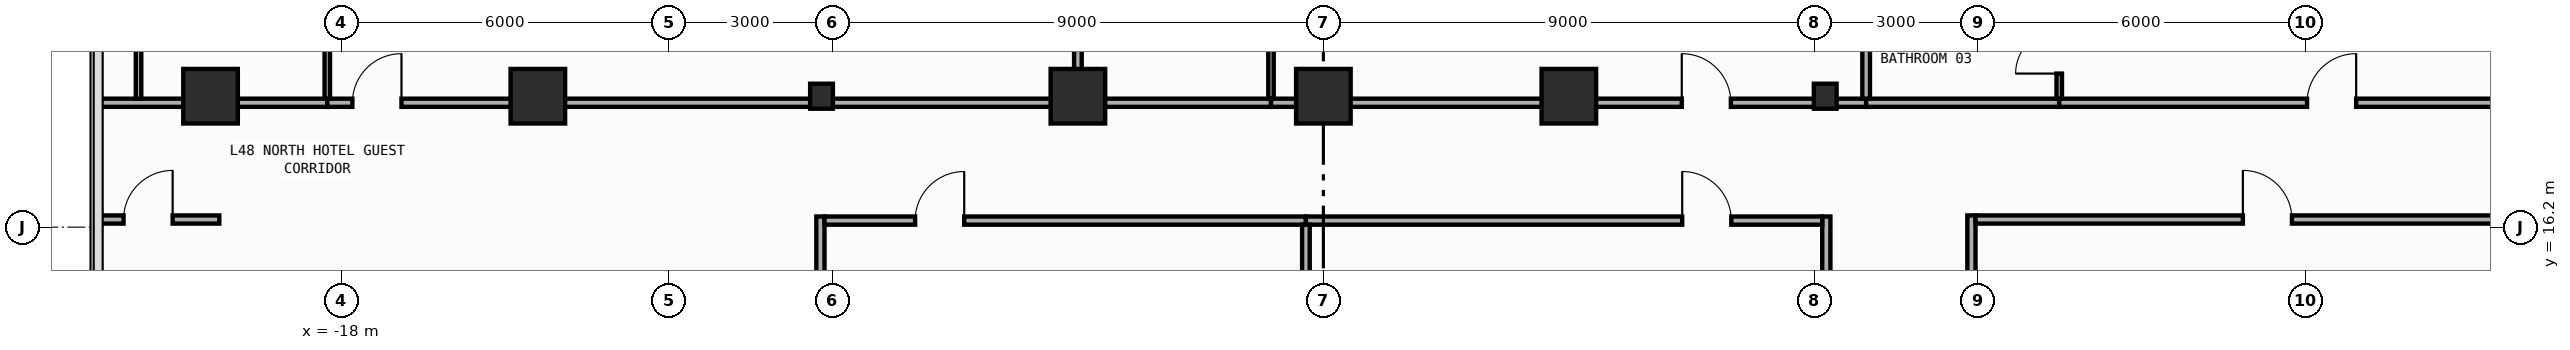
"""IFC4 building model, lengths in metres.
Left out: names, types, materials, properties, quantities, classifications, styles, units other than length and angle.
Written with IfcOpenShell. Run it as: python <this file> out.ifc"""

import sys

from ifc_helpers import new_model, si_unit, direction, frame, frame_2d, origin, origin_2d, place, context, subcontext, project, spatial, rectangle, i_section, extrude, element, fill, save


model = new_model("IFC4")
c1 = context("Model", 3, precision=1e-05, world=origin(), true_north=direction((0.0, 1.0)))
c2 = subcontext(c1, "Body", "Model", "MODEL_VIEW")
j1 = project(units=[si_unit("LENGTHUNIT", "METRE"), si_unit("PLANEANGLEUNIT", "RADIAN")], contexts=[c1])
p1 = place(None, origin())
s1 = spatial("IfcSite", under=j1, at=p1, CompositionType="ELEMENT")
p2 = place(p1, origin())
s2 = spatial("IfcBuilding", under=s1, at=p2, CompositionType="ELEMENT")
p3 = place(p2, frame((0.0, 0.0, 206.8)))
s3 = spatial("IfcBuildingStorey", under=s2, at=p3, CompositionType="ELEMENT", Elevation=206.8)
for number, where, z_axis, x_axis in (
    (1, (-9.2, 18.6, 0.0), (0.0, 0.0, 1.0), (1.0, 0.0, 0.0)),
    (2, (9.2, 18.6, 0.0), (0.0, 0.0, 1.0), (1.0, 0.0, 0.0)),
):
    element("IfcColumn", number, at=place(p3, frame(where, z_axis=z_axis, x_axis=x_axis)), inside=s3, PredefinedType="COLUMN", context=c2, shape_type="SweptSolid", body=[
        extrude(i_section(OverallWidth=0.417, OverallDepth=0.458, WebThickness=0.03, FlangeThickness=0.05, FilletRadius=0.022, at=origin_2d()), origin(), (0.0, 0.0, 1.0), 3.8),
    ])
for number, where, z_axis, x_axis in (
    (3, (-20.4, 18.6, 0.0), (0.0, 0.0, 1.0), (1.0, 0.0, 0.0)),
    (4, (-14.4, 18.6, 0.0), (0.0, 0.0, 1.0), (1.0, 0.0, 0.0)),
    (5, (-4.5, 18.6, 0.0), (0.0, 0.0, 1.0), (1.0, 0.0, 0.0)),
    (6, (0.0, 18.6, 0.0), (0.0, 0.0, 1.0), (1.0, 0.0, 0.0)),
    (7, (4.5, 18.6, 0.0), (0.0, 0.0, 1.0), (1.0, 0.0, 0.0)),
):
    element("IfcColumn", number, at=place(p3, frame(where, z_axis=z_axis, x_axis=x_axis)), inside=s3, PredefinedType="COLUMN", context=c2, shape_type="SweptSolid", body=[
        extrude(rectangle(XDim=1.0, YDim=1.0, at=origin_2d()), origin(), (0.0, 0.0, 1.0), 3.8),
    ])
p4 = place(p3, frame((-9.22, 4.2, 0.0), z_axis=(0.0, 0.0, 1.0), x_axis=(0.0, 1.0, 0.0)))
e8 = element("IfcWall", 8, at=p4, inside=s3, PredefinedType="PARTITIONING", context=c2, shape_type="SweptSolid", body=[
    extrude(rectangle(XDim=12.195, YDim=0.15, at=frame_2d((6.098, 0.0))), origin(), (0.0, 0.0, 1.0), 2.952),
])
p5 = place(p4, frame((0.663, 0.0, 0.0)))
e9 = element("IfcOpeningElement", 9, at=p5, cuts=e8, PredefinedType="OPENING", context=c2, shape_type="SweptSolid", body=[
    extrude(rectangle(XDim=0.9, YDim=2.15, at=frame_2d((0.45, 1.075))), frame((0.0, 0.085, 0.0), z_axis=(0.0, -1.0, 0.0), x_axis=(1.0, 0.0, 0.0)), (0.0, 0.0, 1.0), 0.17),
])
p6 = place(p3, frame((9.22, 4.2, 0.0), z_axis=(0.0, 0.0, 1.0), x_axis=(0.0, 1.0, 0.0)))
e10 = element("IfcWall", 10, at=p6, inside=s3, PredefinedType="PARTITIONING", context=c2, shape_type="SweptSolid", body=[
    extrude(rectangle(XDim=12.195, YDim=0.15, at=frame_2d((6.098, 0.0))), origin(), (0.0, 0.0, 1.0), 2.952),
])
p7 = place(p6, frame((0.663, 0.0, 0.0)))
e11 = element("IfcOpeningElement", 11, at=p7, cuts=e10, PredefinedType="OPENING", context=c2, shape_type="SweptSolid", body=[
    extrude(rectangle(XDim=0.9, YDim=2.15, at=frame_2d((0.45, 1.075))), frame((0.0, 0.085, 0.0), z_axis=(0.0, -1.0, 0.0), x_axis=(1.0, 0.0, 0.0)), (0.0, 0.0, 1.0), 0.17),
])
p8 = place(p3, frame((11.88, 7.16, 0.0), z_axis=(0.0, 0.0, 1.0), x_axis=(0.0, 1.0, 0.0)))
e12 = element("IfcWall", 12, at=p8, inside=s3, PredefinedType="PARTITIONING", context=c2, shape_type="SweptSolid", body=[
    extrude(rectangle(XDim=9.255, YDim=0.15, at=frame_2d((4.627, 0.0))), origin(), (0.0, 0.0, 1.0), 3.54),
])
p9 = place(p8, frame((0.46, 0.0, 0.0)))
e13 = element("IfcOpeningElement", 13, at=p9, cuts=e12, PredefinedType="OPENING", context=c2, shape_type="SweptSolid", body=[
    extrude(rectangle(XDim=0.9, YDim=2.15, at=frame_2d((0.45, 1.075))), frame((0.0, 0.085, 0.0), z_axis=(0.0, -1.0, 0.0), x_axis=(1.0, 0.0, 0.0)), (0.0, 0.0, 1.0), 0.17),
])
p10 = place(p3, frame((-9.145, 16.32, 0.0), z_axis=(0.0, 0.0, 1.0), x_axis=(1.0, 0.0, 0.0)))
e14 = element("IfcWall", 14, at=p10, inside=s3, PredefinedType="PARTITIONING", context=c2, shape_type="SweptSolid", body=[
    extrude(rectangle(XDim=8.825, YDim=0.15, at=frame_2d((4.413, 0.0))), origin(), (0.0, 0.0, 1.0), 3.54),
])
p11 = place(p10, frame((1.661, 0.0, 0.0)))
e15 = element("IfcOpeningElement", 15, at=p11, cuts=e14, PredefinedType="OPENING", context=c2, shape_type="SweptSolid", body=[
    extrude(rectangle(XDim=0.9, YDim=2.15, at=frame_2d((0.45, 1.075))), frame((0.0, 0.085, 0.0), z_axis=(0.0, -1.0, 0.0), x_axis=(1.0, 0.0, 0.0)), (0.0, 0.0, 1.0), 0.17),
])
p12 = place(p3, frame((-0.32, 16.32, 0.0), z_axis=(0.0, 0.0, 1.0), x_axis=(1.0, 0.0, 0.0)))
e16 = element("IfcWall", 16, at=p12, inside=s3, PredefinedType="PARTITIONING", context=c2, shape_type="SweptSolid", body=[
    extrude(rectangle(XDim=9.465, YDim=0.15, at=frame_2d((4.732, 0.0))), origin(), (0.0, 0.0, 1.0), 3.54),
])
p13 = place(p12, frame((6.898, 0.0, 0.0)))
e17 = element("IfcOpeningElement", 17, at=p13, cuts=e16, PredefinedType="OPENING", context=c2, shape_type="SweptSolid", body=[
    extrude(rectangle(XDim=0.9, YDim=2.15, at=frame_2d((0.45, 1.075))), frame((0.0, 0.085, 0.0), z_axis=(0.0, -1.0, 0.0), x_axis=(1.0, 0.0, 0.0)), (0.0, 0.0, 1.0), 0.17),
])
p14 = place(p3, frame((-22.455, 18.48, 0.0), z_axis=(0.0, 0.0, 1.0), x_axis=(1.0, 0.0, 0.0)))
e18 = element("IfcWall", 18, at=p14, inside=s3, PredefinedType="PARTITIONING", context=c2, shape_type="SweptSolid", body=[
    extrude(rectangle(XDim=4.195, YDim=0.15, at=frame_2d((2.098, 0.0))), origin(), (0.0, 0.0, 1.0), 2.952),
])
p15 = place(p3, frame((-18.26, 18.48, 0.0), z_axis=(0.0, 0.0, 1.0), x_axis=(1.0, 0.0, 0.0)))
e19 = element("IfcWall", 19, at=p15, inside=s3, PredefinedType="PARTITIONING", context=c2, shape_type="SweptSolid", body=[
    extrude(rectangle(XDim=13.76, YDim=0.15, at=frame_2d((6.88, 0.0))), origin(), (0.0, 0.0, 1.0), 2.952),
])
p16 = place(p15, frame((0.46, 0.0, 0.0)))
e20 = element("IfcOpeningElement", 20, at=p16, cuts=e19, PredefinedType="OPENING", context=c2, shape_type="SweptSolid", body=[
    extrude(rectangle(XDim=0.9, YDim=2.15, at=frame_2d((0.45, 1.075))), frame((0.0, 0.085, 0.0), z_axis=(0.0, -1.0, 0.0), x_axis=(1.0, 0.0, 0.0)), (0.0, 0.0, 1.0), 0.17),
])
p17 = place(p3, frame((-4.5, 18.48, 0.0), z_axis=(0.0, 0.0, 1.0), x_axis=(1.0, 0.0, 0.0)))
e21 = element("IfcWall", 21, at=p17, inside=s3, PredefinedType="PARTITIONING", context=c2, shape_type="SweptSolid", body=[
    extrude(rectangle(XDim=3.54, YDim=0.15, at=frame_2d((1.77, 0.0))), origin(), (0.0, 0.0, 1.0), 2.952),
])
p18 = place(p3, frame((-0.96, 18.48, 0.0), z_axis=(0.0, 0.0, 1.0), x_axis=(1.0, 0.0, 0.0)))
e22 = element("IfcWall", 22, at=p18, inside=s3, PredefinedType="PARTITIONING", context=c2, shape_type="SweptSolid", body=[
    extrude(rectangle(XDim=10.91, YDim=0.15, at=frame_2d((5.455, 0.0))), origin(), (0.0, 0.0, 1.0), 2.952),
])
p19 = place(p18, frame((7.53, 0.0, 0.0)))
e23 = element("IfcOpeningElement", 23, at=p19, cuts=e22, PredefinedType="OPENING", context=c2, shape_type="SweptSolid", body=[
    extrude(rectangle(XDim=0.9, YDim=2.15, at=frame_2d((0.45, 1.075))), frame((0.0, 0.085, 0.0), z_axis=(0.0, -1.0, 0.0), x_axis=(1.0, 0.0, 0.0)), (0.0, 0.0, 1.0), 0.17),
])
p20 = place(p3, frame((9.95, 18.48, 0.0), z_axis=(0.0, 0.0, 1.0), x_axis=(1.0, 0.0, 0.0)))
e24 = element("IfcWall", 24, at=p20, inside=s3, PredefinedType="PARTITIONING", context=c2, shape_type="SweptSolid", body=[
    extrude(rectangle(XDim=3.54, YDim=0.15, at=frame_2d((1.77, 0.0))), origin(), (0.0, 0.0, 1.0), 3.54),
])
p21 = place(p3, frame((13.49, 18.48, 0.0), z_axis=(0.0, 0.0, 1.0), x_axis=(1.0, 0.0, 0.0)))
e25 = element("IfcWall", 25, at=p21, inside=s3, PredefinedType="PARTITIONING", context=c2, shape_type="SweptSolid", body=[
    extrude(rectangle(XDim=8.965, YDim=0.15, at=frame_2d((4.482, 0.0))), origin(), (0.0, 0.0, 1.0), 3.54),
])
p22 = place(p21, frame((4.543, 0.0, 0.0)))
e26 = element("IfcOpeningElement", 26, at=p22, cuts=e25, PredefinedType="OPENING", context=c2, shape_type="SweptSolid", body=[
    extrude(rectangle(XDim=0.9, YDim=2.15, at=frame_2d((0.45, 1.075))), frame((0.0, 0.085, 0.0), z_axis=(0.0, -1.0, 0.0), x_axis=(1.0, 0.0, 0.0)), (0.0, 0.0, 1.0), 0.17),
])
p23 = place(p3, frame((11.955, 16.34, 0.0), z_axis=(0.0, 0.0, 1.0), x_axis=(1.0, 0.0, 0.0)))
e27 = element("IfcWall", 27, at=p23, inside=s3, PredefinedType="PARTITIONING", context=c2, shape_type="SweptSolid", body=[
    extrude(rectangle(XDim=10.5, YDim=0.15, at=frame_2d((5.25, 0.0))), origin(), (0.0, 0.0, 1.0), 3.54),
])
p24 = place(p23, frame((4.901, 0.0, 0.0)))
e28 = element("IfcOpeningElement", 28, at=p24, cuts=e27, PredefinedType="OPENING", context=c2, shape_type="SweptSolid", body=[
    extrude(rectangle(XDim=0.9, YDim=2.15, at=frame_2d((0.45, 1.075))), frame((0.0, 0.085, 0.0), z_axis=(0.0, -1.0, 0.0), x_axis=(1.0, 0.0, 0.0)), (0.0, 0.0, 1.0), 0.17),
])
p25 = place(p3, frame((-22.455, 16.34, 0.0), z_axis=(0.0, 0.0, 1.0), x_axis=(1.0, 0.0, 0.0)))
e29 = element("IfcWall", 29, at=p25, inside=s3, PredefinedType="PARTITIONING", context=c2, shape_type="SweptSolid", body=[
    extrude(rectangle(XDim=2.215, YDim=0.15, at=frame_2d((1.107, 0.0))), origin(), (0.0, 0.0, 1.0), 3.54),
])
p26 = place(p25, frame((0.46, 0.0, 0.0)))
e30 = element("IfcOpeningElement", 30, at=p26, cuts=e29, PredefinedType="OPENING", context=c2, shape_type="SweptSolid", body=[
    extrude(rectangle(XDim=0.9, YDim=2.15, at=frame_2d((0.45, 1.075))), frame((0.0, 0.085, 0.0), z_axis=(0.0, -1.0, 0.0), x_axis=(1.0, 0.0, 0.0)), (0.0, 0.0, 1.0), 0.17),
])
p27 = place(p3, frame((-0.32, 4.27, 0.0), z_axis=(0.0, 0.0, 1.0), x_axis=(0.0, 1.0, 0.0)))
e31 = element("IfcWall", 31, at=p27, inside=s3, PredefinedType="PARTITIONING", context=c2, shape_type="SweptSolid", body=[
    extrude(rectangle(XDim=11.975, YDim=0.14, at=frame_2d((5.988, 0.0))), origin(), (0.0, 0.0, 1.0), 3.54),
])
p28 = place(p3, frame((-18.26, 18.555, 0.0), z_axis=(0.0, 0.0, 1.0), x_axis=(0.0, 1.0, 0.0)))
e32 = element("IfcWall", 32, at=p28, inside=s3, PredefinedType="PARTITIONING", context=c2, shape_type="SweptSolid", body=[
    extrude(rectangle(XDim=2.965, YDim=0.1, at=frame_2d((1.482, 0.0))), origin(), (0.0, 0.0, 1.0), 3.54),
])
p29 = place(p28, frame((1.705, 0.0, 0.0)))
e33 = element("IfcOpeningElement", 33, at=p29, cuts=e32, PredefinedType="OPENING", context=c2, shape_type="SweptSolid", body=[
    extrude(rectangle(XDim=0.8, YDim=2.1, at=frame_2d((0.4, 1.05))), frame((0.0, 0.06, 0.0), z_axis=(0.0, -1.0, 0.0), x_axis=(1.0, 0.0, 0.0)), (0.0, 0.0, 1.0), 0.12),
])
p30 = place(p3, frame((-4.5, 18.555, 0.0), z_axis=(0.0, 0.0, 1.0), x_axis=(0.0, 1.0, 0.0)))
e34 = element("IfcWall", 34, at=p30, inside=s3, PredefinedType="PARTITIONING", context=c2, shape_type="SweptSolid", body=[
    extrude(rectangle(XDim=3.015, YDim=0.14, at=frame_2d((1.508, 0.0))), origin(), (0.0, 0.0, 1.0), 3.54),
])
p31 = place(p3, frame((-0.96, 18.555, 0.0), z_axis=(0.0, 0.0, 1.0), x_axis=(0.0, 1.0, 0.0)))
e35 = element("IfcWall", 35, at=p31, inside=s3, PredefinedType="PARTITIONING", context=c2, shape_type="SweptSolid", body=[
    extrude(rectangle(XDim=2.965, YDim=0.1, at=frame_2d((1.482, 0.0))), origin(), (0.0, 0.0, 1.0), 3.54),
])
p32 = place(p31, frame((1.705, 0.0, 0.0)))
e36 = element("IfcOpeningElement", 36, at=p32, cuts=e35, PredefinedType="OPENING", context=c2, shape_type="SweptSolid", body=[
    extrude(rectangle(XDim=0.8, YDim=2.1, at=frame_2d((0.4, 1.05))), frame((0.0, 0.06, 0.0), z_axis=(0.0, -1.0, 0.0), x_axis=(1.0, 0.0, 0.0)), (0.0, 0.0, 1.0), 0.12),
])
p33 = place(p3, frame((9.95, 18.555, 0.0), z_axis=(0.0, 0.0, 1.0), x_axis=(0.0, 1.0, 0.0)))
e37 = element("IfcWall", 37, at=p33, inside=s3, PredefinedType="PARTITIONING", context=c2, shape_type="SweptSolid", body=[
    extrude(rectangle(XDim=3.015, YDim=0.14, at=frame_2d((1.508, 0.0))), origin(), (0.0, 0.0, 1.0), 3.54),
])
p34 = place(p3, frame((13.49, 18.555, 0.0), z_axis=(0.0, 0.0, 1.0), x_axis=(0.0, 1.0, 0.0)))
e38 = element("IfcWall", 38, at=p34, inside=s3, PredefinedType="PARTITIONING", context=c2, shape_type="SweptSolid", body=[
    extrude(rectangle(XDim=2.965, YDim=0.1, at=frame_2d((1.482, 0.0))), origin(), (0.0, 0.0, 1.0), 3.54),
])
p35 = place(p34, frame((0.46, 0.0, 0.0)))
e39 = element("IfcOpeningElement", 39, at=p35, cuts=e38, PredefinedType="OPENING", context=c2, shape_type="SweptSolid", body=[
    extrude(rectangle(XDim=0.8, YDim=2.1, at=frame_2d((0.4, 1.05))), frame((0.0, 0.06, 0.0), z_axis=(0.0, -1.0, 0.0), x_axis=(1.0, 0.0, 0.0)), (0.0, 0.0, 1.0), 0.12),
])
p36 = place(p3, frame((-21.72, 18.555, 0.0), z_axis=(0.0, 0.0, 1.0), x_axis=(0.0, 1.0, 0.0)))
e40 = element("IfcWall", 40, at=p36, inside=s3, PredefinedType="PARTITIONING", context=c2, shape_type="SweptSolid", body=[
    extrude(rectangle(XDim=2.965, YDim=0.1, at=frame_2d((1.482, 0.0))), origin(), (0.0, 0.0, 1.0), 3.54),
])
p37 = place(p11, origin())
e41 = element("IfcDoor", 41, at=p37, inside=s3, OperationType="SINGLE_SWING_RIGHT", PredefinedType="DOOR", context=c2, shape_type="SweptSolid", body=[
    extrude(rectangle(XDim=0.9, YDim=2.15, at=frame_2d((0.45, 1.075))), frame((0.0, 0.025, 0.0), z_axis=(0.0, -1.0, 0.0), x_axis=(1.0, 0.0, 0.0)), (0.0, 0.0, 1.0), 0.05),
])
fill(e15, e41)
p38 = place(p13, origin())
e42 = element("IfcDoor", 42, at=p38, inside=s3, OperationType="SINGLE_SWING_LEFT", PredefinedType="DOOR", context=c2, shape_type="SweptSolid", body=[
    extrude(rectangle(XDim=0.9, YDim=2.15, at=frame_2d((0.45, 1.075))), frame((0.0, 0.025, 0.0), z_axis=(0.0, -1.0, 0.0), x_axis=(1.0, 0.0, 0.0)), (0.0, 0.0, 1.0), 0.05),
])
fill(e17, e42)
p39 = place(p16, origin())
e43 = element("IfcDoor", 43, at=p39, inside=s3, OperationType="SINGLE_SWING_RIGHT", PredefinedType="DOOR", context=c2, shape_type="SweptSolid", body=[
    extrude(rectangle(XDim=0.9, YDim=2.15, at=frame_2d((0.45, 1.075))), frame((0.0, 0.025, 0.0), z_axis=(0.0, -1.0, 0.0), x_axis=(1.0, 0.0, 0.0)), (0.0, 0.0, 1.0), 0.05),
])
fill(e20, e43)
p40 = place(p19, origin())
e44 = element("IfcDoor", 44, at=p40, inside=s3, OperationType="SINGLE_SWING_LEFT", PredefinedType="DOOR", context=c2, shape_type="SweptSolid", body=[
    extrude(rectangle(XDim=0.9, YDim=2.15, at=frame_2d((0.45, 1.075))), frame((0.0, 0.025, 0.0), z_axis=(0.0, -1.0, 0.0), x_axis=(1.0, 0.0, 0.0)), (0.0, 0.0, 1.0), 0.05),
])
fill(e23, e44)
p41 = place(p22, origin())
e45 = element("IfcDoor", 45, at=p41, inside=s3, OperationType="SINGLE_SWING_RIGHT", PredefinedType="DOOR", context=c2, shape_type="SweptSolid", body=[
    extrude(rectangle(XDim=0.9, YDim=2.15, at=frame_2d((0.45, 1.075))), frame((0.0, 0.025, 0.0), z_axis=(0.0, -1.0, 0.0), x_axis=(1.0, 0.0, 0.0)), (0.0, 0.0, 1.0), 0.05),
])
fill(e26, e45)
p42 = place(p24, origin())
e46 = element("IfcDoor", 46, at=p42, inside=s3, OperationType="SINGLE_SWING_LEFT", PredefinedType="DOOR", context=c2, shape_type="SweptSolid", body=[
    extrude(rectangle(XDim=0.9, YDim=2.15, at=frame_2d((0.45, 1.075))), frame((0.0, 0.025, 0.0), z_axis=(0.0, -1.0, 0.0), x_axis=(1.0, 0.0, 0.0)), (0.0, 0.0, 1.0), 0.05),
])
fill(e28, e46)
p43 = place(p26, origin())
e47 = element("IfcDoor", 47, at=p43, inside=s3, OperationType="SINGLE_SWING_RIGHT", PredefinedType="DOOR", context=c2, shape_type="SweptSolid", body=[
    extrude(rectangle(XDim=0.9, YDim=2.15, at=frame_2d((0.45, 1.075))), frame((0.0, 0.025, 0.0), z_axis=(0.0, -1.0, 0.0), x_axis=(1.0, 0.0, 0.0)), (0.0, 0.0, 1.0), 0.05),
])
fill(e30, e47)
p44 = place(p35, origin())
e48 = element("IfcDoor", 48, at=p44, inside=s3, OperationType="SINGLE_SWING_LEFT", PredefinedType="DOOR", context=c2, shape_type="SweptSolid", body=[
    extrude(rectangle(XDim=0.8, YDim=2.1, at=frame_2d((0.4, 1.05))), frame((0.0, 0.025, 0.0), z_axis=(0.0, -1.0, 0.0), x_axis=(1.0, 0.0, 0.0)), (0.0, 0.0, 1.0), 0.05),
])
fill(e39, e48)
save(model, sys.argv[1])
